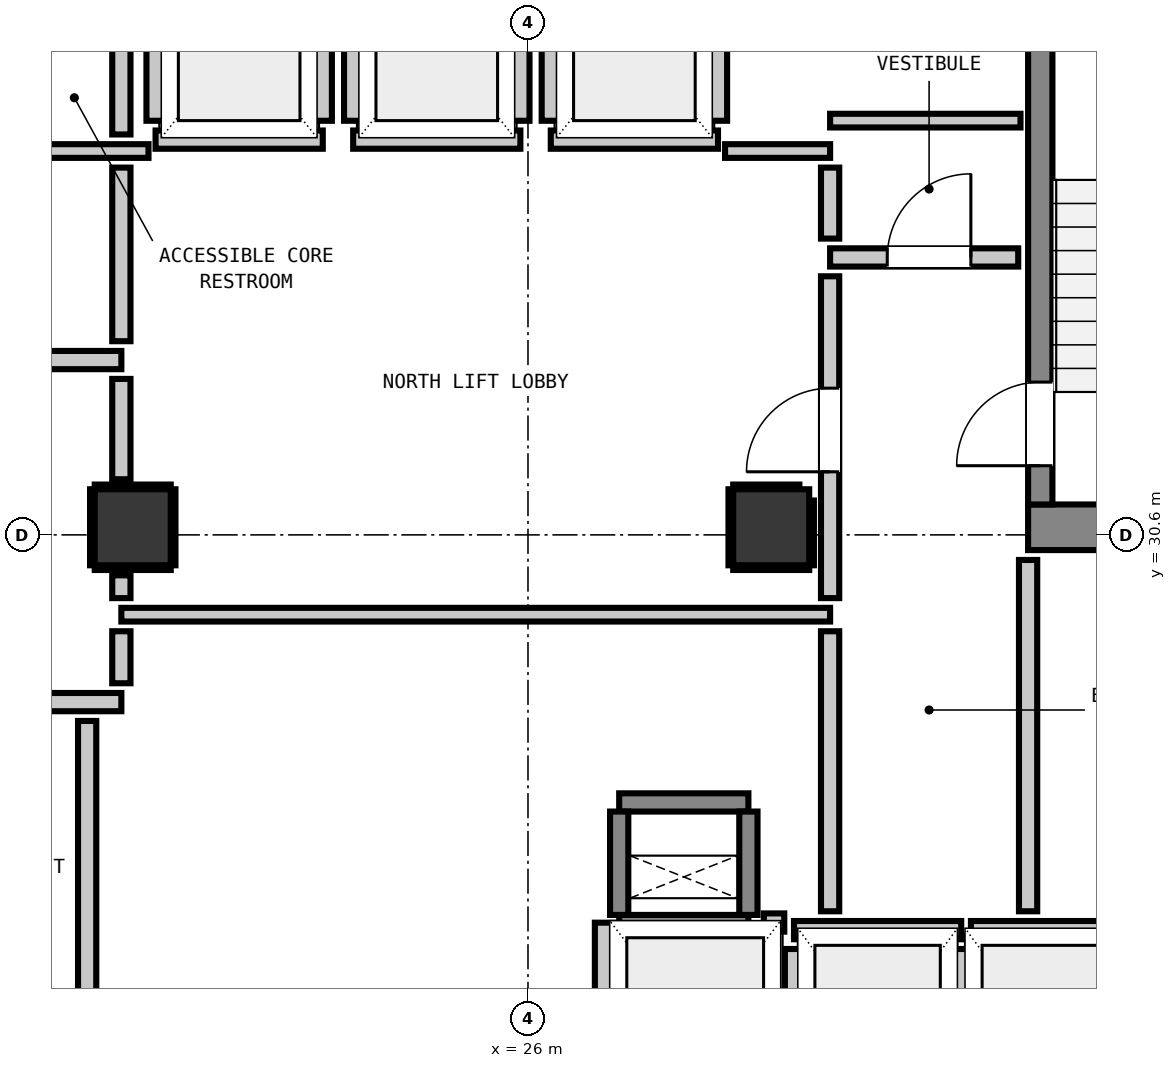
"""IFC4 building model, lengths in metres.
Left out: names, types, materials, properties, quantities, classifications, styles, units other than length and angle.
Written with IfcOpenShell. Run it as: python <this file> out.ifc"""

import sys

from ifc_helpers import new_model, si_unit, direction, frame, frame_2d, origin, origin_2d, place, context, subcontext, project, spatial, rectangle, extrude, element, fill, save


model = new_model("IFC4")
c1 = context("Model", 3, precision=1e-05, world=origin(), true_north=direction((0.0, 1.0)))
c2 = subcontext(c1, "Body", "Model", "MODEL_VIEW")
j1 = project(units=[si_unit("LENGTHUNIT", "METRE"), si_unit("PLANEANGLEUNIT", "RADIAN")], contexts=[c1])
p1 = place(None, origin())
s1 = spatial("IfcSite", under=j1, at=p1, CompositionType="ELEMENT")
p2 = place(p1, origin())
s2 = spatial("IfcBuilding", under=s1, at=p2, CompositionType="ELEMENT")
p3 = place(p2, frame((0.0, 0.0, 58.52)))
s3 = spatial("IfcBuildingStorey", under=s2, at=p3, CompositionType="ELEMENT", Elevation=58.52)
p4 = place(p3, frame((32.58, 30.7, 0.0), z_axis=(0.0, 0.0, 1.0), x_axis=(1.0, 0.0, 0.0)))
e1 = element("IfcWall", 1, at=p4, inside=s3, PredefinedType="SHEAR", context=c2, shape_type="SweptSolid", body=[
    extrude(rectangle(XDim=3.415, YDim=0.6, at=frame_2d((1.708, 0.0))), origin(), (0.0, 0.0, 1.0), 3.32),
])
p5 = place(p3, frame((32.74, 31.0, 0.0), z_axis=(0.0, 0.0, 1.0), x_axis=(0.0, 1.0, 0.0)))
e2 = element("IfcWall", 2, at=p5, inside=s3, PredefinedType="SHEAR", context=c2, shape_type="SweptSolid", body=[
    extrude(rectangle(XDim=7.8, YDim=0.32, at=frame_2d((3.9, 0.0))), origin(), (0.0, 0.0, 1.0), 3.32),
])
p6 = place(p5, frame((0.51, 0.0, 0.0)))
e3 = element("IfcOpeningElement", 3, at=p6, cuts=e2, PredefinedType="OPENING", context=c2, shape_type="SweptSolid", body=[
    extrude(rectangle(XDim=1.1, YDim=2.15, at=frame_2d((0.55, 1.075))), frame((0.0, 0.17, 0.0), z_axis=(0.0, -1.0, 0.0), x_axis=(1.0, 0.0, 0.0)), (0.0, 0.0, 1.0), 0.34),
])
for number, where, z_axis, x_axis in (
    (4, (27.2, 25.48, 0.0), (0.0, 0.0, 1.0), (1.0, 0.0, 0.0)),
    (5, (27.2, 27.08, 0.0), (0.0, 0.0, 1.0), (1.0, 0.0, 0.0)),
):
    element("IfcWall", number, at=place(p3, frame(where, z_axis=z_axis, x_axis=x_axis)), inside=s3, PredefinedType="SHEAR", context=c2, shape_type="SweptSolid", body=[
        extrude(rectangle(XDim=1.7, YDim=0.24, at=frame_2d((0.85, 0.0))), origin(), (0.0, 0.0, 1.0), 3.32),
    ])
for number, where, z_axis, x_axis in (
    (6, (27.2, 25.6, 0.0), (0.0, 0.0, 1.0), (0.0, 1.0, 0.0)),
    (7, (28.9, 25.6, 0.0), (0.0, 0.0, 1.0), (0.0, 1.0, 0.0)),
):
    element("IfcWall", number, at=place(p3, frame(where, z_axis=z_axis, x_axis=x_axis)), inside=s3, PredefinedType="SHEAR", context=c2, shape_type="SweptSolid", body=[
        extrude(rectangle(XDim=1.36, YDim=0.24, at=frame_2d((0.68, 0.0))), origin(), (0.0, 0.0, 1.0), 3.32),
    ])
for number, where, z_axis, x_axis in (
    (8, (20.8, 30.7, 0.0), (0.0, 0.0, 1.0), (1.0, 0.0, 0.0)),
    (9, (29.2, 30.7, 0.0), (0.0, 0.0, 1.0), (1.0, 0.0, 0.0)),
):
    element("IfcColumn", number, at=place(p3, frame(where, z_axis=z_axis, x_axis=x_axis)), inside=s3, PredefinedType="COLUMN", context=c2, shape_type="SweptSolid", body=[
        extrude(rectangle(XDim=1.0, YDim=1.0, at=origin_2d()), origin(), (0.0, 0.0, 1.0), 3.32),
    ])
p7 = place(p3, frame((21.1, 35.8, 0.0), z_axis=(0.0, 0.0, 1.0), x_axis=(1.0, 0.0, 0.0)))
e10 = element("IfcWall", 10, at=p7, inside=s3, PredefinedType="PARTITIONING", context=c2, shape_type="SweptSolid", body=[
    extrude(rectangle(XDim=2.2, YDim=0.24, at=frame_2d((1.1, 0.0))), origin(), (0.0, 0.0, 1.0), 2.9),
])
p8 = place(p3, frame((21.1, 36.048, 0.0), z_axis=(0.0, 0.0, 1.0), x_axis=(0.0, 1.0, 0.0)))
e11 = element("IfcWall", 11, at=p8, inside=s3, PredefinedType="PARTITIONING", context=c2, shape_type="SweptSolid", body=[
    extrude(rectangle(XDim=2.104, YDim=0.24, at=frame_2d((1.052, 0.0))), origin(), (0.0, 0.0, 1.0), 0.905),
])
p9 = place(p3, frame((23.3, 36.048, 0.0), z_axis=(0.0, 0.0, 1.0), x_axis=(0.0, 1.0, 0.0)))
e12 = element("IfcWall", 12, at=p9, inside=s3, PredefinedType="PARTITIONING", context=c2, shape_type="SweptSolid", body=[
    extrude(rectangle(XDim=2.104, YDim=0.24, at=frame_2d((1.052, 0.0))), origin(), (0.0, 0.0, 1.0), 2.9),
])
p10 = place(p3, frame((23.7, 35.8, 0.0), z_axis=(0.0, 0.0, 1.0), x_axis=(1.0, 0.0, 0.0)))
e13 = element("IfcWall", 13, at=p10, inside=s3, PredefinedType="PARTITIONING", context=c2, shape_type="SweptSolid", body=[
    extrude(rectangle(XDim=2.2, YDim=0.24, at=frame_2d((1.1, 0.0))), origin(), (0.0, 0.0, 1.0), 2.9),
])
for number, where, z_axis, x_axis in (
    (14, (23.7, 36.048, 0.0), (0.0, 0.0, 1.0), (0.0, 1.0, 0.0)),
    (15, (25.9, 36.048, 0.0), (0.0, 0.0, 1.0), (0.0, 1.0, 0.0)),
):
    element("IfcWall", number, at=place(p3, frame(where, z_axis=z_axis, x_axis=x_axis)), inside=s3, PredefinedType="PARTITIONING", context=c2, shape_type="SweptSolid", body=[
        extrude(rectangle(XDim=2.104, YDim=0.24, at=frame_2d((1.052, 0.0))), origin(), (0.0, 0.0, 1.0), 2.9),
    ])
p11 = place(p3, frame((26.3, 35.8, 0.0), z_axis=(0.0, 0.0, 1.0), x_axis=(1.0, 0.0, 0.0)))
e16 = element("IfcWall", 16, at=p11, inside=s3, PredefinedType="PARTITIONING", context=c2, shape_type="SweptSolid", body=[
    extrude(rectangle(XDim=2.2, YDim=0.24, at=frame_2d((1.1, 0.0))), origin(), (0.0, 0.0, 1.0), 2.9),
])
p12 = place(p3, frame((26.3, 36.048, 0.0), z_axis=(0.0, 0.0, 1.0), x_axis=(0.0, 1.0, 0.0)))
e17 = element("IfcWall", 17, at=p12, inside=s3, PredefinedType="PARTITIONING", context=c2, shape_type="SweptSolid", body=[
    extrude(rectangle(XDim=2.104, YDim=0.24, at=frame_2d((1.052, 0.0))), origin(), (0.0, 0.0, 1.0), 2.9),
])
p13 = place(p3, frame((28.5, 36.048, 0.0), z_axis=(0.0, 0.0, 1.0), x_axis=(0.0, 1.0, 0.0)))
e18 = element("IfcWall", 18, at=p13, inside=s3, PredefinedType="PARTITIONING", context=c2, shape_type="SweptSolid", body=[
    extrude(rectangle(XDim=2.104, YDim=0.24, at=frame_2d((1.052, 0.0))), origin(), (0.0, 0.0, 1.0), 0.905),
])
p14 = place(p3, frame((29.5, 25.4, 0.0), z_axis=(0.0, 0.0, 1.0), x_axis=(1.0, 0.0, 0.0)))
e19 = element("IfcWall", 19, at=p14, inside=s3, PredefinedType="PARTITIONING", context=c2, shape_type="SweptSolid", body=[
    extrude(rectangle(XDim=2.2, YDim=0.24, at=frame_2d((1.1, 0.0))), origin(), (0.0, 0.0, 1.0), 2.9),
])
p15 = place(p3, frame((29.5, 22.632, 0.0), z_axis=(0.0, 0.0, 1.0), x_axis=(0.0, 1.0, 0.0)))
e20 = element("IfcWall", 20, at=p15, inside=s3, PredefinedType="PARTITIONING", context=c2, shape_type="SweptSolid", body=[
    extrude(rectangle(XDim=2.52, YDim=0.24, at=frame_2d((1.26, 0.0))), origin(), (0.0, 0.0, 1.0), 0.905),
])
p16 = place(p3, frame((31.7, 22.73, 0.0), z_axis=(0.0, 0.0, 1.0), x_axis=(0.0, 1.0, 0.0)))
e21 = element("IfcWall", 21, at=p16, inside=s3, PredefinedType="PARTITIONING", context=c2, shape_type="SweptSolid", body=[
    extrude(rectangle(XDim=2.422, YDim=0.24, at=frame_2d((1.211, 0.0))), origin(), (0.0, 0.0, 1.0), 2.9),
])
p17 = place(p3, frame((31.828, 25.4, 0.0), z_axis=(0.0, 0.0, 1.0), x_axis=(1.0, 0.0, 0.0)))
e22 = element("IfcWall", 22, at=p17, inside=s3, PredefinedType="PARTITIONING", context=c2, shape_type="SweptSolid", body=[
    extrude(rectangle(XDim=2.072, YDim=0.24, at=frame_2d((1.036, 0.0))), origin(), (0.0, 0.0, 1.0), 2.9),
])
p18 = place(p3, frame((29.103, 25.5, 0.0), z_axis=(0.0, 0.0, 1.0), x_axis=(1.0, 0.0, 0.0)))
e23 = element("IfcWall", 23, at=p18, inside=s3, PredefinedType="PARTITIONING", context=c2, shape_type="SweptSolid", body=[
    extrude(rectangle(XDim=0.269, YDim=0.24, at=frame_2d((0.135, 0.0))), origin(), (0.0, 0.0, 1.0), 2.9),
])
p19 = place(p3, frame((27.0, 22.73, 0.0), z_axis=(0.0, 0.0, 1.0), x_axis=(0.0, 1.0, 0.0)))
e24 = element("IfcWall", 24, at=p19, inside=s3, PredefinedType="PARTITIONING", context=c2, shape_type="SweptSolid", body=[
    extrude(rectangle(XDim=2.768, YDim=0.24, at=frame_2d((1.384, 0.0))), origin(), (0.0, 0.0, 1.0), 2.9),
])
p20 = place(p3, frame((17.45, 28.4, 0.0), z_axis=(0.0, 0.0, 1.0), x_axis=(1.0, 0.0, 0.0)))
e25 = element("IfcWall", 25, at=p20, inside=s3, PredefinedType="PARTITIONING", context=c2, shape_type="SweptSolid", body=[
    extrude(rectangle(XDim=3.2, YDim=0.24, at=frame_2d((1.6, 0.0))), origin(), (0.0, 0.0, 1.0), 2.9),
])
p21 = place(p20, frame((0.784, 0.0, 0.0)))
e26 = element("IfcOpeningElement", 26, at=p21, cuts=e25, PredefinedType="OPENING", context=c2, shape_type="SweptSolid", body=[
    extrude(rectangle(XDim=1.1, YDim=2.15, at=frame_2d((0.55, 1.075))), frame((0.0, 0.13, 0.0), z_axis=(0.0, -1.0, 0.0), x_axis=(1.0, 0.0, 0.0)), (0.0, 0.0, 1.0), 0.26),
])
p22 = place(p3, frame((17.45, 32.9, 0.0), z_axis=(0.0, 0.0, 1.0), x_axis=(1.0, 0.0, 0.0)))
e27 = element("IfcWall", 27, at=p22, inside=s3, PredefinedType="PARTITIONING", context=c2, shape_type="SweptSolid", body=[
    extrude(rectangle(XDim=3.2, YDim=0.24, at=frame_2d((1.6, 0.0))), origin(), (0.0, 0.0, 1.0), 2.9),
])
p23 = place(p22, frame((0.159, 0.0, 0.0)))
e28 = element("IfcOpeningElement", 28, at=p23, cuts=e27, PredefinedType="OPENING", context=c2, shape_type="SweptSolid", body=[
    extrude(rectangle(XDim=1.1, YDim=2.15, at=frame_2d((0.55, 1.075))), frame((0.0, 0.13, 0.0), z_axis=(0.0, -1.0, 0.0), x_axis=(1.0, 0.0, 0.0)), (0.0, 0.0, 1.0), 0.26),
])
p24 = place(p3, frame((29.975, 34.25, 0.0), z_axis=(0.0, 0.0, 1.0), x_axis=(1.0, 0.0, 0.0)))
e29 = element("IfcWall", 29, at=p24, inside=s3, PredefinedType="PARTITIONING", context=c2, shape_type="SweptSolid", body=[
    extrude(rectangle(XDim=2.475, YDim=0.24, at=frame_2d((1.237, 0.0))), origin(), (0.0, 0.0, 1.0), 2.9),
])
p25 = place(p24, frame((0.752, 0.0, 0.0)))
e30 = element("IfcOpeningElement", 30, at=p25, cuts=e29, PredefinedType="OPENING", context=c2, shape_type="SweptSolid", body=[
    extrude(rectangle(XDim=1.1, YDim=2.15, at=frame_2d((0.55, 1.075))), frame((0.0, 0.13, 0.0), z_axis=(0.0, -1.0, 0.0), x_axis=(1.0, 0.0, 0.0)), (0.0, 0.0, 1.0), 0.26),
])
p26 = place(p3, frame((20.65, 29.55, 0.0), z_axis=(0.0, 0.0, 1.0), x_axis=(1.0, 0.0, 0.0)))
e31 = element("IfcWall", 31, at=p26, inside=s3, PredefinedType="PARTITIONING", context=c2, shape_type="SweptSolid", body=[
    extrude(rectangle(XDim=9.325, YDim=0.18, at=frame_2d((4.663, 0.0))), origin(), (0.0, 0.0, 1.0), 2.9),
])
p27 = place(p3, frame((18.95, 35.65, 0.0), z_axis=(0.0, 0.0, 1.0), x_axis=(1.0, 0.0, 0.0)))
e32 = element("IfcWall", 32, at=p27, inside=s3, PredefinedType="PARTITIONING", context=c2, shape_type="SweptSolid", body=[
    extrude(rectangle(XDim=2.057, YDim=0.18, at=frame_2d((1.029, 0.0))), origin(), (0.0, 0.0, 1.0), 2.9),
])
p28 = place(p3, frame((28.593, 35.65, 0.0), z_axis=(0.0, 0.0, 1.0), x_axis=(1.0, 0.0, 0.0)))
e33 = element("IfcWall", 33, at=p28, inside=s3, PredefinedType="PARTITIONING", context=c2, shape_type="SweptSolid", body=[
    extrude(rectangle(XDim=1.382, YDim=0.18, at=frame_2d((0.691, 0.0))), origin(), (0.0, 0.0, 1.0), 2.9),
])
p29 = place(p3, frame((29.975, 36.05, 0.0), z_axis=(0.0, 0.0, 1.0), x_axis=(1.0, 0.0, 0.0)))
e34 = element("IfcWall", 34, at=p29, inside=s3, PredefinedType="PARTITIONING", context=c2, shape_type="SweptSolid", body=[
    extrude(rectangle(XDim=2.505, YDim=0.18, at=frame_2d((1.252, 0.0))), origin(), (0.0, 0.0, 1.0), 2.9),
])
p30 = place(p3, frame((20.2, 22.586, 0.0), z_axis=(0.0, 0.0, 1.0), x_axis=(0.0, 1.0, 0.0)))
e35 = element("IfcWall", 35, at=p30, inside=s3, PredefinedType="PARTITIONING", context=c2, shape_type="SweptSolid", body=[
    extrude(rectangle(XDim=5.566, YDim=0.24, at=frame_2d((2.783, 0.0))), origin(), (0.0, 0.0, 1.0), 0.905),
])
p31 = place(p3, frame((20.65, 28.648, 0.0), z_axis=(0.0, 0.0, 1.0), x_axis=(0.0, 1.0, 0.0)))
e36 = element("IfcWall", 36, at=p31, inside=s3, PredefinedType="PARTITIONING", context=c2, shape_type="SweptSolid", body=[
    extrude(rectangle(XDim=0.684, YDim=0.24, at=frame_2d((0.342, 0.0))), origin(), (0.0, 0.0, 1.0), 0.905),
])
p32 = place(p3, frame((20.65, 29.768, 0.0), z_axis=(0.0, 0.0, 1.0), x_axis=(0.0, 1.0, 0.0)))
e37 = element("IfcWall", 37, at=p32, inside=s3, PredefinedType="PARTITIONING", context=c2, shape_type="SweptSolid", body=[
    extrude(rectangle(XDim=0.3, YDim=0.24, at=frame_2d((0.15, 0.0))), origin(), (0.0, 0.0, 1.0), 0.905),
])
p33 = place(p3, frame((20.65, 31.332, 0.0), z_axis=(0.0, 0.0, 1.0), x_axis=(0.0, 1.0, 0.0)))
e38 = element("IfcWall", 38, at=p33, inside=s3, PredefinedType="PARTITIONING", context=c2, shape_type="SweptSolid", body=[
    extrude(rectangle(XDim=1.32, YDim=0.24, at=frame_2d((0.66, 0.0))), origin(), (0.0, 0.0, 1.0), 0.905),
])
p34 = place(p3, frame((20.65, 33.148, 0.0), z_axis=(0.0, 0.0, 1.0), x_axis=(0.0, 1.0, 0.0)))
e39 = element("IfcWall", 39, at=p34, inside=s3, PredefinedType="PARTITIONING", context=c2, shape_type="SweptSolid", body=[
    extrude(rectangle(XDim=2.284, YDim=0.24, at=frame_2d((1.142, 0.0))), origin(), (0.0, 0.0, 1.0), 0.905),
])
p35 = place(p3, frame((20.65, 35.868, 0.0), z_axis=(0.0, 0.0, 1.0), x_axis=(0.0, 1.0, 0.0)))
e40 = element("IfcWall", 40, at=p35, inside=s3, PredefinedType="PARTITIONING", context=c2, shape_type="SweptSolid", body=[
    extrude(rectangle(XDim=2.684, YDim=0.24, at=frame_2d((1.342, 0.0))), origin(), (0.0, 0.0, 1.0), 0.905),
])
p36 = place(p3, frame((29.975, 25.648, 0.0), z_axis=(0.0, 0.0, 1.0), x_axis=(0.0, 1.0, 0.0)))
e41 = element("IfcWall", 41, at=p36, inside=s3, PredefinedType="PARTITIONING", context=c2, shape_type="SweptSolid", body=[
    extrude(rectangle(XDim=3.684, YDim=0.24, at=frame_2d((1.842, 0.0))), origin(), (0.0, 0.0, 1.0), 2.9),
])
p37 = place(p3, frame((29.975, 29.768, 0.0), z_axis=(0.0, 0.0, 1.0), x_axis=(0.0, 1.0, 0.0)))
e42 = element("IfcWall", 42, at=p37, inside=s3, PredefinedType="PARTITIONING", context=c2, shape_type="SweptSolid", body=[
    extrude(rectangle(XDim=4.234, YDim=0.24, at=frame_2d((2.117, 0.0))), origin(), (0.0, 0.0, 1.0), 2.9),
])
p38 = place(p37, frame((1.662, 0.0, 0.0)))
e43 = element("IfcOpeningElement", 43, at=p38, cuts=e42, PredefinedType="OPENING", context=c2, shape_type="SweptSolid", body=[
    extrude(rectangle(XDim=1.1, YDim=2.15, at=frame_2d((0.55, 1.075))), frame((0.0, 0.13, 0.0), z_axis=(0.0, -1.0, 0.0), x_axis=(1.0, 0.0, 0.0)), (0.0, 0.0, 1.0), 0.26),
])
p39 = place(p3, frame((29.975, 34.498, 0.0), z_axis=(0.0, 0.0, 1.0), x_axis=(0.0, 1.0, 0.0)))
e44 = element("IfcWall", 44, at=p39, inside=s3, PredefinedType="PARTITIONING", context=c2, shape_type="SweptSolid", body=[
    extrude(rectangle(XDim=0.934, YDim=0.24, at=frame_2d((0.467, 0.0))), origin(), (0.0, 0.0, 1.0), 2.9),
])
p40 = place(p3, frame((32.58, 25.648, 0.0), z_axis=(0.0, 0.0, 1.0), x_axis=(0.0, 1.0, 0.0)))
e45 = element("IfcWall", 45, at=p40, inside=s3, PredefinedType="PARTITIONING", context=c2, shape_type="SweptSolid", body=[
    extrude(rectangle(XDim=4.622, YDim=0.24, at=frame_2d((2.311, 0.0))), origin(), (0.0, 0.0, 1.0), 2.9),
])
for number, where, z_axis, x_axis in (
    (46, (20.3, 30.168, 0.0), (0.0, 0.0, 1.0), (1.0, 0.0, 0.0)),
    (47, (20.3, 31.232, 0.0), (0.0, 0.0, 1.0), (1.0, 0.0, 0.0)),
    (48, (20.268, 30.2, 0.0), (0.0, 0.0, 1.0), (0.0, 1.0, 0.0)),
    (49, (21.332, 30.2, 0.0), (0.0, 0.0, 1.0), (0.0, 1.0, 0.0)),
    (50, (28.7, 30.168, 0.0), (0.0, 0.0, 1.0), (1.0, 0.0, 0.0)),
):
    element("IfcWall", number, at=place(p3, frame(where, z_axis=z_axis, x_axis=x_axis)), inside=s3, PredefinedType="PARTITIONING", context=c2, shape_type="SweptSolid", body=[
        extrude(rectangle(XDim=1.0, YDim=0.06, at=frame_2d((0.5, 0.0))), origin(), (0.0, 0.0, 1.0), 0.905),
    ])
p41 = place(p3, frame((28.7, 31.232, 0.0), z_axis=(0.0, 0.0, 1.0), x_axis=(1.0, 0.0, 0.0)))
e51 = element("IfcWall", 51, at=p41, inside=s3, PredefinedType="PARTITIONING", context=c2, shape_type="SweptSolid", body=[
    extrude(rectangle(XDim=0.871, YDim=0.06, at=frame_2d((0.436, 0.0))), origin(), (0.0, 0.0, 1.0), 0.905),
])
p42 = place(p3, frame((28.668, 30.2, 0.0), z_axis=(0.0, 0.0, 1.0), x_axis=(0.0, 1.0, 0.0)))
e52 = element("IfcWall", 52, at=p42, inside=s3, PredefinedType="PARTITIONING", context=c2, shape_type="SweptSolid", body=[
    extrude(rectangle(XDim=1.0, YDim=0.06, at=frame_2d((0.5, 0.0))), origin(), (0.0, 0.0, 1.0), 0.905),
])
p43 = place(p3, frame((29.732, 30.2, 0.0), z_axis=(0.0, 0.0, 1.0), x_axis=(0.0, 1.0, 0.0)))
e53 = element("IfcWall", 53, at=p43, inside=s3, PredefinedType="PARTITIONING", context=c2, shape_type="SweptSolid", body=[
    extrude(rectangle(XDim=0.852, YDim=0.06, at=frame_2d((0.426, 0.0))), origin(), (0.0, 0.0, 1.0), 0.905),
])
p44 = place(p6, origin())
e54 = element("IfcDoor", 54, at=p44, inside=s3, OperationType="SINGLE_SWING_LEFT", PredefinedType="DOOR", context=c2, shape_type="SweptSolid", body=[
    extrude(rectangle(XDim=1.1, YDim=2.15, at=frame_2d((0.55, 1.075))), frame((0.0, 0.025, 0.0), z_axis=(0.0, -1.0, 0.0), x_axis=(1.0, 0.0, 0.0)), (0.0, 0.0, 1.0), 0.05),
])
fill(e3, e54)
p45 = place(p38, origin())
e55 = element("IfcDoor", 55, at=p45, inside=s3, OperationType="SINGLE_SWING_LEFT", PredefinedType="DOOR", context=c2, shape_type="SweptSolid", body=[
    extrude(rectangle(XDim=1.1, YDim=2.15, at=frame_2d((0.55, 1.075))), frame((0.0, 0.025, 0.0), z_axis=(0.0, -1.0, 0.0), x_axis=(1.0, 0.0, 0.0)), (0.0, 0.0, 1.0), 0.05),
])
fill(e43, e55)
p46 = place(p25, origin())
e56 = element("IfcDoor", 56, at=p46, inside=s3, OperationType="SINGLE_SWING_RIGHT", PredefinedType="DOOR", context=c2, shape_type="SweptSolid", body=[
    extrude(rectangle(XDim=1.1, YDim=2.15, at=frame_2d((0.55, 1.075))), frame((0.0, 0.025, 0.0), z_axis=(0.0, -1.0, 0.0), x_axis=(1.0, 0.0, 0.0)), (0.0, 0.0, 1.0), 0.05),
])
fill(e30, e56)
save(model, sys.argv[1])
